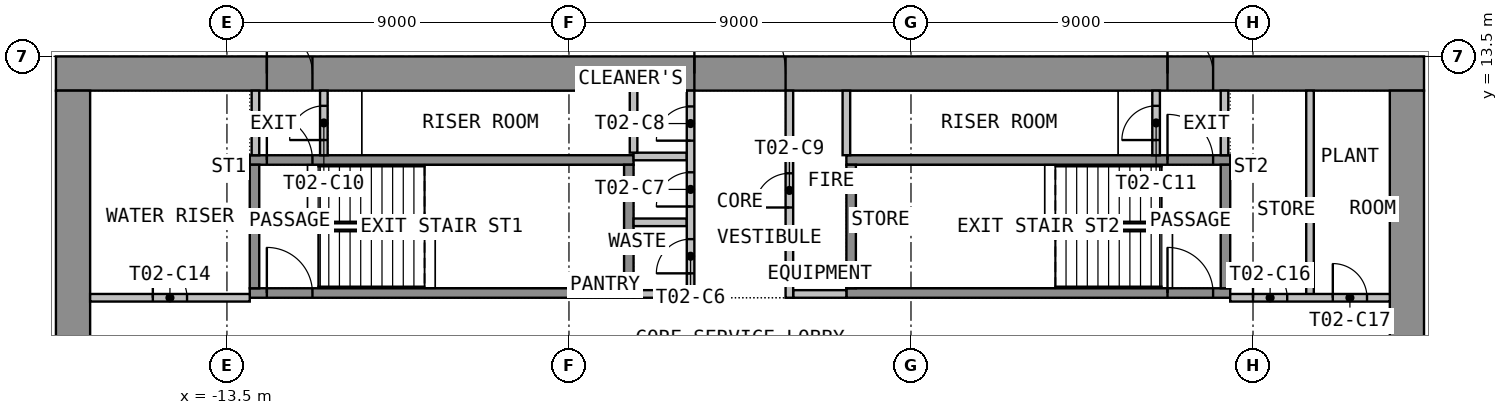
"""IFC4 building model, lengths in metres.
Left out: names, types, materials, properties, quantities, classifications, styles, units other than length and angle.
Written with IfcOpenShell. Run it as: python <this file> out.ifc"""

import sys

from ifc_helpers import new_model, si_unit, direction, frame, frame_2d, origin, place, context, subcontext, project, spatial, rectangle, extrude, element, fill, save


model = new_model("IFC4")
c1 = context("Model", 3, precision=1e-05, world=origin(), true_north=direction((0.0, 1.0)))
c2 = subcontext(c1, "Body", "Model", "MODEL_VIEW")
j1 = project(units=[si_unit("LENGTHUNIT", "METRE"), si_unit("PLANEANGLEUNIT", "RADIAN")], contexts=[c1])
p1 = place(None, origin())
s1 = spatial("IfcSite", under=j1, at=p1, CompositionType="ELEMENT")
p2 = place(p1, origin())
s2 = spatial("IfcBuilding", under=s1, at=p2, CompositionType="ELEMENT")
p3 = place(p2, frame((0.0, 0.0, 41.7)))
s3 = spatial("IfcBuildingStorey", under=s2, at=p3, CompositionType="ELEMENT", Elevation=41.7)
p4 = place(p3, frame((-18.0, 13.05, 0.0), z_axis=(0.0, 0.0, 1.0), x_axis=(1.0, 0.0, 0.0)))
e1 = element("IfcWall", 1, at=p4, inside=s3, PredefinedType="SHEAR", context=c2, shape_type="SweptSolid", body=[
    extrude(rectangle(XDim=36.0, YDim=0.9, at=frame_2d((18.0, 0.0))), origin(), (0.0, 0.0, 1.0), 3.525),
])
p5 = place(p4, frame((16.8, 0.0, 0.0)))
e2 = element("IfcOpeningElement", 2, at=p5, cuts=e1, PredefinedType="OPENING", context=c2, shape_type="SweptSolid", body=[
    extrude(rectangle(XDim=2.4, YDim=2.1, at=frame_2d((1.2, 1.05))), frame((0.0, 0.46, 0.0), z_axis=(0.0, -1.0, 0.0), x_axis=(1.0, 0.0, 0.0)), (0.0, 0.0, 1.0), 0.92),
])
p6 = place(p4, frame((5.55, 0.0, 0.0)))
e3 = element("IfcOpeningElement", 3, at=p6, cuts=e1, PredefinedType="OPENING", context=c2, shape_type="SweptSolid", body=[
    extrude(rectangle(XDim=1.2, YDim=2.1, at=frame_2d((0.6, 1.05))), frame((0.0, 0.46, 0.0), z_axis=(0.0, -1.0, 0.0), x_axis=(1.0, 0.0, 0.0)), (0.0, 0.0, 1.0), 0.92),
])
p7 = place(p4, frame((29.25, 0.0, 0.0)))
e4 = element("IfcOpeningElement", 4, at=p7, cuts=e1, PredefinedType="OPENING", context=c2, shape_type="SweptSolid", body=[
    extrude(rectangle(XDim=1.2, YDim=2.1, at=frame_2d((0.6, 1.05))), frame((0.0, 0.46, 0.0), z_axis=(0.0, -1.0, 0.0), x_axis=(1.0, 0.0, 0.0)), (0.0, 0.0, 1.0), 0.92),
])
p8 = place(p3, frame((-17.55, -12.6, 0.0), z_axis=(0.0, 0.0, 1.0), x_axis=(0.0, 1.0, 0.0)))
e5 = element("IfcWall", 5, at=p8, inside=s3, PredefinedType="SHEAR", context=c2, shape_type="SweptSolid", body=[
    extrude(rectangle(XDim=25.2, YDim=0.9, at=frame_2d((12.6, 0.0))), origin(), (0.0, 0.0, 1.0), 3.525),
])
p9 = place(p8, frame((11.4, 0.0, 0.0)))
e6 = element("IfcOpeningElement", 6, at=p9, cuts=e5, PredefinedType="OPENING", context=c2, shape_type="SweptSolid", body=[
    extrude(rectangle(XDim=2.4, YDim=2.1, at=frame_2d((1.2, 1.05))), frame((0.0, 0.46, 0.0), z_axis=(0.0, -1.0, 0.0), x_axis=(1.0, 0.0, 0.0)), (0.0, 0.0, 1.0), 0.92),
])
p10 = place(p3, frame((17.55, -12.6, 0.0), z_axis=(0.0, 0.0, 1.0), x_axis=(0.0, 1.0, 0.0)))
e7 = element("IfcWall", 7, at=p10, inside=s3, PredefinedType="SHEAR", context=c2, shape_type="SweptSolid", body=[
    extrude(rectangle(XDim=25.2, YDim=0.9, at=frame_2d((12.6, 0.0))), origin(), (0.0, 0.0, 1.0), 3.525),
])
p11 = place(p10, frame((11.4, 0.0, 0.0)))
e8 = element("IfcOpeningElement", 8, at=p11, cuts=e7, PredefinedType="OPENING", context=c2, shape_type="SweptSolid", body=[
    extrude(rectangle(XDim=2.4, YDim=2.1, at=frame_2d((1.2, 1.05))), frame((0.0, 0.46, 0.0), z_axis=(0.0, -1.0, 0.0), x_axis=(1.0, 0.0, 0.0)), (0.0, 0.0, 1.0), 0.92),
])
p12 = place(p3, frame((-12.9, 7.275, 0.0), z_axis=(0.0, 0.0, 1.0), x_axis=(1.0, 0.0, 0.0)))
e9 = element("IfcWall", 9, at=p12, inside=s3, PredefinedType="SHEAR", context=c2, shape_type="SweptSolid", body=[
    extrude(rectangle(XDim=10.1, YDim=0.25, at=frame_2d((5.05, 0.0))), origin(), (0.0, 0.0, 1.0), 3.525),
])
p13 = place(p12, frame((0.45, 0.0, 0.0)))
e10 = element("IfcOpeningElement", 10, at=p13, cuts=e9, PredefinedType="OPENING", context=c2, shape_type="SweptSolid", body=[
    extrude(rectangle(XDim=1.2, YDim=2.1, at=frame_2d((0.6, 1.05))), frame((0.0, 0.135, 0.0), z_axis=(0.0, -1.0, 0.0), x_axis=(1.0, 0.0, 0.0)), (0.0, 0.0, 1.0), 0.27),
])
p14 = place(p3, frame((-12.9, 10.775, 0.0), z_axis=(0.0, 0.0, 1.0), x_axis=(1.0, 0.0, 0.0)))
e11 = element("IfcWall", 11, at=p14, inside=s3, PredefinedType="SHEAR", context=c2, shape_type="SweptSolid", body=[
    extrude(rectangle(XDim=10.1, YDim=0.25, at=frame_2d((5.05, 0.0))), origin(), (0.0, 0.0, 1.0), 3.525),
])
p15 = place(p14, frame((0.45, 0.0, 0.0)))
e12 = element("IfcOpeningElement", 12, at=p15, cuts=e11, PredefinedType="OPENING", context=c2, shape_type="SweptSolid", body=[
    extrude(rectangle(XDim=1.2, YDim=2.1, at=frame_2d((0.6, 1.05))), frame((0.0, 0.135, 0.0), z_axis=(0.0, -1.0, 0.0), x_axis=(1.0, 0.0, 0.0)), (0.0, 0.0, 1.0), 0.27),
])
for number, where, z_axis, x_axis in (
    (13, (-12.775, 7.4, 0.0), (0.0, 0.0, 1.0), (0.0, 1.0, 0.0)),
    (14, (-2.925, 7.4, 0.0), (0.0, 0.0, 1.0), (0.0, 1.0, 0.0)),
):
    element("IfcWall", number, at=place(p3, frame(where, z_axis=z_axis, x_axis=x_axis)), inside=s3, PredefinedType="SHEAR", context=c2, shape_type="SweptSolid", body=[
        extrude(rectangle(XDim=3.25, YDim=0.25, at=frame_2d((1.625, 0.0))), origin(), (0.0, 0.0, 1.0), 3.525),
    ])
p16 = place(p3, frame((2.8, 7.275, 0.0), z_axis=(0.0, 0.0, 1.0), x_axis=(1.0, 0.0, 0.0)))
e15 = element("IfcWall", 15, at=p16, inside=s3, PredefinedType="SHEAR", context=c2, shape_type="SweptSolid", body=[
    extrude(rectangle(XDim=10.1, YDim=0.25, at=frame_2d((5.05, 0.0))), origin(), (0.0, 0.0, 1.0), 3.525),
])
p17 = place(p16, frame((8.45, 0.0, 0.0)))
e16 = element("IfcOpeningElement", 16, at=p17, cuts=e15, PredefinedType="OPENING", context=c2, shape_type="SweptSolid", body=[
    extrude(rectangle(XDim=1.2, YDim=2.1, at=frame_2d((0.6, 1.05))), frame((0.0, 0.135, 0.0), z_axis=(0.0, -1.0, 0.0), x_axis=(1.0, 0.0, 0.0)), (0.0, 0.0, 1.0), 0.27),
])
p18 = place(p3, frame((2.8, 10.775, 0.0), z_axis=(0.0, 0.0, 1.0), x_axis=(1.0, 0.0, 0.0)))
e17 = element("IfcWall", 17, at=p18, inside=s3, PredefinedType="SHEAR", context=c2, shape_type="SweptSolid", body=[
    extrude(rectangle(XDim=10.1, YDim=0.25, at=frame_2d((5.05, 0.0))), origin(), (0.0, 0.0, 1.0), 3.525),
])
p19 = place(p18, frame((8.45, 0.0, 0.0)))
e18 = element("IfcOpeningElement", 18, at=p19, cuts=e17, PredefinedType="OPENING", context=c2, shape_type="SweptSolid", body=[
    extrude(rectangle(XDim=1.2, YDim=2.1, at=frame_2d((0.6, 1.05))), frame((0.0, 0.135, 0.0), z_axis=(0.0, -1.0, 0.0), x_axis=(1.0, 0.0, 0.0)), (0.0, 0.0, 1.0), 0.27),
])
for number, where, z_axis, x_axis in (
    (19, (2.925, 7.4, 0.0), (0.0, 0.0, 1.0), (0.0, 1.0, 0.0)),
    (20, (12.775, 7.4, 0.0), (0.0, 0.0, 1.0), (0.0, 1.0, 0.0)),
):
    element("IfcWall", number, at=place(p3, frame(where, z_axis=z_axis, x_axis=x_axis)), inside=s3, PredefinedType="SHEAR", context=c2, shape_type="SweptSolid", body=[
        extrude(rectangle(XDim=3.25, YDim=0.25, at=frame_2d((1.625, 0.0))), origin(), (0.0, 0.0, 1.0), 3.525),
    ])
for number, where, z_axis, x_axis in (
    (21, (-2.8, 7.25, 0.0), (0.0, 0.0, 1.0), (1.0, 0.0, 0.0)),
    (22, (-2.8, 9.135, 0.0), (0.0, 0.0, 1.0), (1.0, 0.0, 0.0)),
    (23, (-2.8, 10.867, 0.0), (0.0, 0.0, 1.0), (1.0, 0.0, 0.0)),
    (24, (1.4, 7.25, 0.0), (0.0, 0.0, 1.0), (1.0, 0.0, 0.0)),
):
    element("IfcWall", number, at=place(p3, frame(where, z_axis=z_axis, x_axis=x_axis)), inside=s3, PredefinedType="PARTITIONING", context=c2, shape_type="SweptSolid", body=[
        extrude(rectangle(XDim=1.4, YDim=0.2, at=frame_2d((0.7, 0.0))), origin(), (0.0, 0.0, 1.0), 3.525),
    ])
p20 = place(p3, frame((-1.3, 7.15, 0.0), z_axis=(0.0, 0.0, 1.0), x_axis=(0.0, 1.0, 0.0)))
e25 = element("IfcWall", 25, at=p20, inside=s3, PredefinedType="PARTITIONING", context=c2, shape_type="SweptSolid", body=[
    extrude(rectangle(XDim=5.45, YDim=0.2, at=frame_2d((2.725, 0.0))), origin(), (0.0, 0.0, 1.0), 3.525),
])
p21 = place(p20, frame((0.643, 0.0, 0.0)))
e26 = element("IfcOpeningElement", 26, at=p21, cuts=e25, PredefinedType="OPENING", context=c2, shape_type="SweptSolid", body=[
    extrude(rectangle(XDim=0.9, YDim=2.1, at=frame_2d((0.45, 1.05))), frame((0.0, 0.11, 0.0), z_axis=(0.0, -1.0, 0.0), x_axis=(1.0, 0.0, 0.0)), (0.0, 0.0, 1.0), 0.22),
])
p22 = place(p20, frame((2.401, 0.0, 0.0)))
e27 = element("IfcOpeningElement", 27, at=p22, cuts=e25, PredefinedType="OPENING", context=c2, shape_type="SweptSolid", body=[
    extrude(rectangle(XDim=0.9, YDim=2.1, at=frame_2d((0.45, 1.05))), frame((0.0, 0.11, 0.0), z_axis=(0.0, -1.0, 0.0), x_axis=(1.0, 0.0, 0.0)), (0.0, 0.0, 1.0), 0.22),
])
p23 = place(p20, frame((4.134, 0.0, 0.0)))
e28 = element("IfcOpeningElement", 28, at=p23, cuts=e25, PredefinedType="OPENING", context=c2, shape_type="SweptSolid", body=[
    extrude(rectangle(XDim=0.9, YDim=2.1, at=frame_2d((0.45, 1.05))), frame((0.0, 0.11, 0.0), z_axis=(0.0, -1.0, 0.0), x_axis=(1.0, 0.0, 0.0)), (0.0, 0.0, 1.0), 0.22),
])
p24 = place(p3, frame((1.3, 7.15, 0.0), z_axis=(0.0, 0.0, 1.0), x_axis=(0.0, 1.0, 0.0)))
e29 = element("IfcWall", 29, at=p24, inside=s3, PredefinedType="PARTITIONING", context=c2, shape_type="SweptSolid", body=[
    extrude(rectangle(XDim=5.45, YDim=0.2, at=frame_2d((2.725, 0.0))), origin(), (0.0, 0.0, 1.0), 3.525),
])
p25 = place(p24, frame((2.375, 0.0, 0.0)))
e30 = element("IfcOpeningElement", 30, at=p25, cuts=e29, PredefinedType="OPENING", context=c2, shape_type="SweptSolid", body=[
    extrude(rectangle(XDim=0.9, YDim=2.1, at=frame_2d((0.45, 1.05))), frame((0.0, 0.11, 0.0), z_axis=(0.0, -1.0, 0.0), x_axis=(1.0, 0.0, 0.0)), (0.0, 0.0, 1.0), 0.22),
])
p26 = place(p3, frame((-12.75, 10.9, 0.0), z_axis=(0.0, 0.0, 1.0), x_axis=(0.0, 1.0, 0.0)))
e31 = element("IfcWall", 31, at=p26, inside=s3, PredefinedType="PARTITIONING", context=c2, shape_type="SweptSolid", body=[
    extrude(rectangle(XDim=1.7, YDim=0.2, at=frame_2d((0.85, 0.0))), origin(), (0.0, 0.0, 1.0), 3.525),
])
p27 = place(p3, frame((-10.95, 10.9, 0.0), z_axis=(0.0, 0.0, 1.0), x_axis=(0.0, 1.0, 0.0)))
e32 = element("IfcWall", 32, at=p27, inside=s3, PredefinedType="PARTITIONING", context=c2, shape_type="SweptSolid", body=[
    extrude(rectangle(XDim=1.7, YDim=0.2, at=frame_2d((0.85, 0.0))), origin(), (0.0, 0.0, 1.0), 3.525),
])
p28 = place(p27, frame((0.4, 0.0, 0.0)))
e33 = element("IfcOpeningElement", 33, at=p28, cuts=e32, PredefinedType="OPENING", context=c2, shape_type="SweptSolid", body=[
    extrude(rectangle(XDim=0.9, YDim=2.1, at=frame_2d((0.45, 1.05))), frame((0.0, 0.11, 0.0), z_axis=(0.0, -1.0, 0.0), x_axis=(1.0, 0.0, 0.0)), (0.0, 0.0, 1.0), 0.22),
])
p29 = place(p3, frame((12.75, 10.9, 0.0), z_axis=(0.0, 0.0, 1.0), x_axis=(0.0, 1.0, 0.0)))
e34 = element("IfcWall", 34, at=p29, inside=s3, PredefinedType="PARTITIONING", context=c2, shape_type="SweptSolid", body=[
    extrude(rectangle(XDim=1.7, YDim=0.2, at=frame_2d((0.85, 0.0))), origin(), (0.0, 0.0, 1.0), 3.525),
])
p30 = place(p3, frame((10.95, 10.9, 0.0), z_axis=(0.0, 0.0, 1.0), x_axis=(0.0, 1.0, 0.0)))
e35 = element("IfcWall", 35, at=p30, inside=s3, PredefinedType="PARTITIONING", context=c2, shape_type="SweptSolid", body=[
    extrude(rectangle(XDim=1.7, YDim=0.2, at=frame_2d((0.85, 0.0))), origin(), (0.0, 0.0, 1.0), 3.525),
])
p31 = place(p30, frame((0.4, 0.0, 0.0)))
e36 = element("IfcOpeningElement", 36, at=p31, cuts=e35, PredefinedType="OPENING", context=c2, shape_type="SweptSolid", body=[
    extrude(rectangle(XDim=0.9, YDim=2.1, at=frame_2d((0.45, 1.05))), frame((0.0, 0.11, 0.0), z_axis=(0.0, -1.0, 0.0), x_axis=(1.0, 0.0, 0.0)), (0.0, 0.0, 1.0), 0.22),
])
p32 = place(p3, frame((-17.1, 7.15, 0.0), z_axis=(0.0, 0.0, 1.0), x_axis=(1.0, 0.0, 0.0)))
e37 = element("IfcWall", 37, at=p32, inside=s3, PredefinedType="PARTITIONING", context=c2, shape_type="SweptSolid", body=[
    extrude(rectangle(XDim=4.2, YDim=0.2, at=frame_2d((2.1, 0.0))), origin(), (0.0, 0.0, 1.0), 3.525),
])
p33 = place(p32, frame((1.65, 0.0, 0.0)))
e38 = element("IfcOpeningElement", 38, at=p33, cuts=e37, PredefinedType="OPENING", context=c2, shape_type="SweptSolid", body=[
    extrude(rectangle(XDim=0.9, YDim=2.1, at=frame_2d((0.45, 1.05))), frame((0.0, 0.11, 0.0), z_axis=(0.0, -1.0, 0.0), x_axis=(1.0, 0.0, 0.0)), (0.0, 0.0, 1.0), 0.22),
])
p34 = place(p3, frame((15.0, 7.15, 0.0), z_axis=(0.0, 0.0, 1.0), x_axis=(0.0, 1.0, 0.0)))
e39 = element("IfcWall", 39, at=p34, inside=s3, PredefinedType="PARTITIONING", context=c2, shape_type="SweptSolid", body=[
    extrude(rectangle(XDim=5.45, YDim=0.2, at=frame_2d((2.725, 0.0))), origin(), (0.0, 0.0, 1.0), 3.525),
])
p35 = place(p3, frame((12.9, 7.15, 0.0), z_axis=(0.0, 0.0, 1.0), x_axis=(1.0, 0.0, 0.0)))
e40 = element("IfcWall", 40, at=p35, inside=s3, PredefinedType="PARTITIONING", context=c2, shape_type="SweptSolid", body=[
    extrude(rectangle(XDim=4.2, YDim=0.2, at=frame_2d((2.1, 0.0))), origin(), (0.0, 0.0, 1.0), 3.525),
])
p36 = place(p35, frame((0.6, 0.0, 0.0)))
e41 = element("IfcOpeningElement", 41, at=p36, cuts=e40, PredefinedType="OPENING", context=c2, shape_type="SweptSolid", body=[
    extrude(rectangle(XDim=0.9, YDim=2.1, at=frame_2d((0.45, 1.05))), frame((0.0, 0.11, 0.0), z_axis=(0.0, -1.0, 0.0), x_axis=(1.0, 0.0, 0.0)), (0.0, 0.0, 1.0), 0.22),
])
p37 = place(p35, frame((2.7, 0.0, 0.0)))
e42 = element("IfcOpeningElement", 42, at=p37, cuts=e40, PredefinedType="OPENING", context=c2, shape_type="SweptSolid", body=[
    extrude(rectangle(XDim=0.9, YDim=2.1, at=frame_2d((0.45, 1.05))), frame((0.0, 0.11, 0.0), z_axis=(0.0, -1.0, 0.0), x_axis=(1.0, 0.0, 0.0)), (0.0, 0.0, 1.0), 0.22),
])
p38 = place(p3, frame((-2.8, 10.969, 0.0), z_axis=(0.0, 0.0, 1.0), x_axis=(0.0, 1.0, 0.0)))
e43 = element("IfcWall", 43, at=p38, inside=s3, PredefinedType="PARTITIONING", context=c2, shape_type="SweptSolid", body=[
    extrude(rectangle(XDim=1.631, YDim=0.2, at=frame_2d((0.815, 0.0))), origin(), (0.0, 0.0, 1.0), 3.525),
])
p39 = place(p3, frame((2.8, 12.599, 0.0), z_axis=(0.0, 0.0, 1.0), x_axis=(0.0, -1.0, 0.0)))
e44 = element("IfcWall", 44, at=p39, inside=s3, PredefinedType="PARTITIONING", context=c2, shape_type="SweptSolid", body=[
    extrude(rectangle(XDim=1.698, YDim=0.2, at=frame_2d((0.849, 0.0))), origin(), (0.0, 0.0, 1.0), 3.525),
])
p40 = place(p5, origin())
e45 = element("IfcDoor", 45, at=p40, inside=s3, OperationType="DOUBLE_DOOR_DOUBLE_SWING", PredefinedType="DOOR", context=c2, shape_type="SweptSolid", body=[
    extrude(rectangle(XDim=2.4, YDim=2.1, at=frame_2d((1.2, 1.05))), frame((0.0, 0.025, 0.0), z_axis=(0.0, -1.0, 0.0), x_axis=(1.0, 0.0, 0.0)), (0.0, 0.0, 1.0), 0.05),
])
fill(e2, e45)
p41 = place(p6, origin())
e46 = element("IfcDoor", 46, at=p41, inside=s3, OperationType="SINGLE_SWING_RIGHT", PredefinedType="DOOR", context=c2, shape_type="SweptSolid", body=[
    extrude(rectangle(XDim=1.2, YDim=2.1, at=frame_2d((0.6, 1.05))), frame((0.0, 0.025, 0.0), z_axis=(0.0, -1.0, 0.0), x_axis=(1.0, 0.0, 0.0)), (0.0, 0.0, 1.0), 0.05),
])
fill(e3, e46)
p42 = place(p7, origin())
e47 = element("IfcDoor", 47, at=p42, inside=s3, OperationType="SINGLE_SWING_RIGHT", PredefinedType="DOOR", context=c2, shape_type="SweptSolid", body=[
    extrude(rectangle(XDim=1.2, YDim=2.1, at=frame_2d((0.6, 1.05))), frame((0.0, 0.025, 0.0), z_axis=(0.0, -1.0, 0.0), x_axis=(1.0, 0.0, 0.0)), (0.0, 0.0, 1.0), 0.05),
])
fill(e4, e47)
p43 = place(p13, origin())
e48 = element("IfcDoor", 48, at=p43, inside=s3, OperationType="SINGLE_SWING_LEFT", PredefinedType="DOOR", context=c2, shape_type="SweptSolid", body=[
    extrude(rectangle(XDim=1.2, YDim=2.1, at=frame_2d((0.6, 1.05))), frame((0.0, 0.025, 0.0), z_axis=(0.0, -1.0, 0.0), x_axis=(1.0, 0.0, 0.0)), (0.0, 0.0, 1.0), 0.05),
])
fill(e10, e48)
p44 = place(p17, origin())
e49 = element("IfcDoor", 49, at=p44, inside=s3, OperationType="SINGLE_SWING_LEFT", PredefinedType="DOOR", context=c2, shape_type="SweptSolid", body=[
    extrude(rectangle(XDim=1.2, YDim=2.1, at=frame_2d((0.6, 1.05))), frame((0.0, 0.025, 0.0), z_axis=(0.0, -1.0, 0.0), x_axis=(1.0, 0.0, 0.0)), (0.0, 0.0, 1.0), 0.05),
])
fill(e16, e49)
p45 = place(p21, origin())
e50 = element("IfcDoor", 50, at=p45, inside=s3, OperationType="SINGLE_SWING_LEFT", PredefinedType="DOOR", context=c2, shape_type="SweptSolid", body=[
    extrude(rectangle(XDim=0.9, YDim=2.1, at=frame_2d((0.45, 1.05))), frame((0.0, 0.025, 0.0), z_axis=(0.0, -1.0, 0.0), x_axis=(1.0, 0.0, 0.0)), (0.0, 0.0, 1.0), 0.05),
])
fill(e26, e50)
p46 = place(p22, origin())
e51 = element("IfcDoor", 51, at=p46, inside=s3, OperationType="SINGLE_SWING_LEFT", PredefinedType="DOOR", context=c2, shape_type="SweptSolid", body=[
    extrude(rectangle(XDim=0.9, YDim=2.1, at=frame_2d((0.45, 1.05))), frame((0.0, 0.025, 0.0), z_axis=(0.0, -1.0, 0.0), x_axis=(1.0, 0.0, 0.0)), (0.0, 0.0, 1.0), 0.05),
])
fill(e27, e51)
p47 = place(p23, origin())
e52 = element("IfcDoor", 52, at=p47, inside=s3, OperationType="SINGLE_SWING_LEFT", PredefinedType="DOOR", context=c2, shape_type="SweptSolid", body=[
    extrude(rectangle(XDim=0.9, YDim=2.1, at=frame_2d((0.45, 1.05))), frame((0.0, 0.025, 0.0), z_axis=(0.0, -1.0, 0.0), x_axis=(1.0, 0.0, 0.0)), (0.0, 0.0, 1.0), 0.05),
])
fill(e28, e52)
p48 = place(p25, origin())
e53 = element("IfcDoor", 53, at=p48, inside=s3, OperationType="SINGLE_SWING_LEFT", PredefinedType="DOOR", context=c2, shape_type="SweptSolid", body=[
    extrude(rectangle(XDim=0.9, YDim=2.1, at=frame_2d((0.45, 1.05))), frame((0.0, 0.025, 0.0), z_axis=(0.0, -1.0, 0.0), x_axis=(1.0, 0.0, 0.0)), (0.0, 0.0, 1.0), 0.05),
])
fill(e30, e53)
p49 = place(p15, origin())
e54 = element("IfcDoor", 54, at=p49, inside=s3, OperationType="SINGLE_SWING_RIGHT", PredefinedType="DOOR", context=c2, shape_type="SweptSolid", body=[
    extrude(rectangle(XDim=1.2, YDim=2.1, at=frame_2d((0.6, 1.05))), frame((0.0, 0.025, 0.0), z_axis=(0.0, -1.0, 0.0), x_axis=(1.0, 0.0, 0.0)), (0.0, 0.0, 1.0), 0.05),
])
fill(e12, e54)
p50 = place(p28, origin())
e55 = element("IfcDoor", 55, at=p50, inside=s3, OperationType="SINGLE_SWING_LEFT", PredefinedType="DOOR", context=c2, shape_type="SweptSolid", body=[
    extrude(rectangle(XDim=0.9, YDim=2.1, at=frame_2d((0.45, 1.05))), frame((0.0, 0.025, 0.0), z_axis=(0.0, -1.0, 0.0), x_axis=(1.0, 0.0, 0.0)), (0.0, 0.0, 1.0), 0.05),
])
fill(e33, e55)
p51 = place(p19, origin())
e56 = element("IfcDoor", 56, at=p51, inside=s3, OperationType="SINGLE_SWING_RIGHT", PredefinedType="DOOR", context=c2, shape_type="SweptSolid", body=[
    extrude(rectangle(XDim=1.2, YDim=2.1, at=frame_2d((0.6, 1.05))), frame((0.0, 0.025, 0.0), z_axis=(0.0, -1.0, 0.0), x_axis=(1.0, 0.0, 0.0)), (0.0, 0.0, 1.0), 0.05),
])
fill(e18, e56)
p52 = place(p31, origin())
e57 = element("IfcDoor", 57, at=p52, inside=s3, OperationType="SINGLE_SWING_LEFT", PredefinedType="DOOR", context=c2, shape_type="SweptSolid", body=[
    extrude(rectangle(XDim=0.9, YDim=2.1, at=frame_2d((0.45, 1.05))), frame((0.0, 0.025, 0.0), z_axis=(0.0, -1.0, 0.0), x_axis=(1.0, 0.0, 0.0)), (0.0, 0.0, 1.0), 0.05),
])
fill(e36, e57)
p53 = place(p33, origin())
e58 = element("IfcDoor", 58, at=p53, inside=s3, OperationType="SINGLE_SWING_LEFT", PredefinedType="DOOR", context=c2, shape_type="SweptSolid", body=[
    extrude(rectangle(XDim=0.9, YDim=2.1, at=frame_2d((0.45, 1.05))), frame((0.0, 0.025, 0.0), z_axis=(0.0, -1.0, 0.0), x_axis=(1.0, 0.0, 0.0)), (0.0, 0.0, 1.0), 0.05),
])
fill(e38, e58)
p54 = place(p36, origin())
e59 = element("IfcDoor", 59, at=p54, inside=s3, OperationType="SINGLE_SWING_LEFT", PredefinedType="DOOR", context=c2, shape_type="SweptSolid", body=[
    extrude(rectangle(XDim=0.9, YDim=2.1, at=frame_2d((0.45, 1.05))), frame((0.0, 0.025, 0.0), z_axis=(0.0, -1.0, 0.0), x_axis=(1.0, 0.0, 0.0)), (0.0, 0.0, 1.0), 0.05),
])
fill(e41, e59)
p55 = place(p37, origin())
e60 = element("IfcDoor", 60, at=p55, inside=s3, OperationType="SINGLE_SWING_LEFT", PredefinedType="DOOR", context=c2, shape_type="SweptSolid", body=[
    extrude(rectangle(XDim=0.9, YDim=2.1, at=frame_2d((0.45, 1.05))), frame((0.0, 0.025, 0.0), z_axis=(0.0, -1.0, 0.0), x_axis=(1.0, 0.0, 0.0)), (0.0, 0.0, 1.0), 0.05),
])
fill(e42, e60)
save(model, sys.argv[1])
